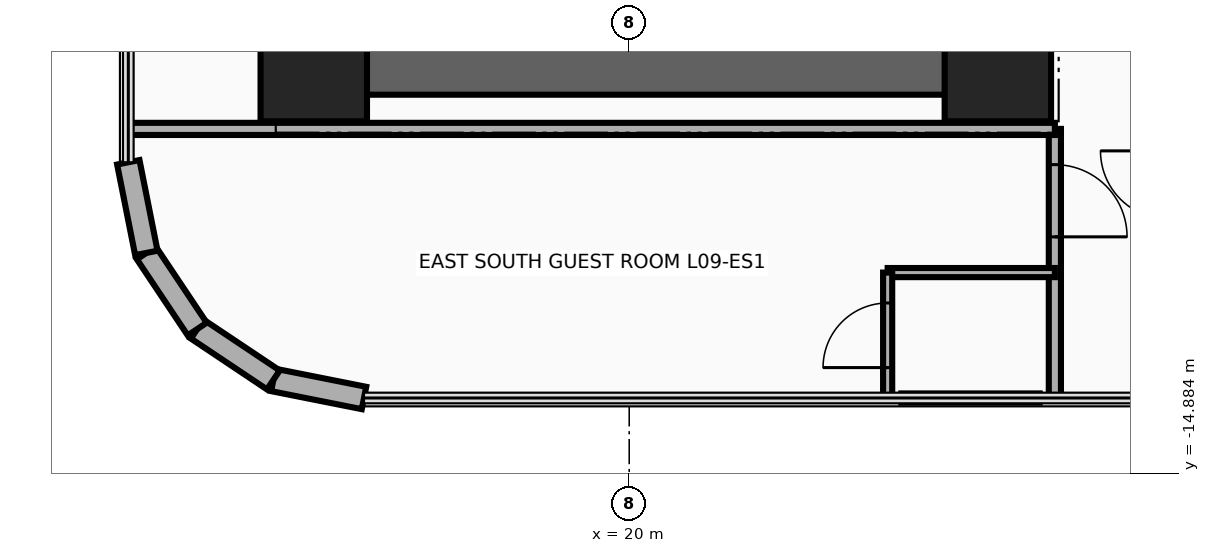
"""IFC4 building model, lengths in metres.
Left out: names, types, materials, properties, quantities, classifications, styles, units other than length and angle.
Written with IfcOpenShell. Run it as: python <this file> out.ifc"""

import sys

from ifc_helpers import new_model, si_unit, direction, frame, frame_2d, origin, origin_2d, place, context, subcontext, project, spatial, rectangle, extrude, source, transform, mapped, element, fill, save


model = new_model("IFC4")
c1 = context("Model", 3, precision=1e-05, world=origin(), true_north=direction((0.0, 1.0)))
c2 = subcontext(c1, "Body", "Model", "MODEL_VIEW")
j1 = project(units=[si_unit("LENGTHUNIT", "METRE"), si_unit("PLANEANGLEUNIT", "RADIAN")], contexts=[c1])
p1 = place(None, origin())
s1 = spatial("IfcSite", under=j1, at=p1, CompositionType="ELEMENT")
p2 = place(p1, origin())
s2 = spatial("IfcBuilding", under=s1, at=p2, CompositionType="ELEMENT")
p3 = place(p2, frame((0.0, 0.0, 40.8)))
s3 = spatial("IfcBuildingStorey", under=s2, at=p3, CompositionType="ELEMENT", Elevation=40.8)
p4 = place(p3, frame((24.85, -9.9, 0.0), z_axis=(0.0, 0.0, 1.0), x_axis=(0.0, 1.0, 0.0)))
e1 = element("IfcWall", 1, at=p4, inside=s3, PredefinedType="SHEAR", context=c2, shape_type="SweptSolid", body=[
    extrude(rectangle(XDim=8.95, YDim=0.7, at=frame_2d((4.475, 0.0))), origin(), (0.0, 0.0, 1.0), 3.46),
])
p5 = place(p3, frame((15.85, -9.55, 0.0), z_axis=(0.0, 0.0, 1.0), x_axis=(1.0, 0.0, 0.0)))
e2 = element("IfcWall", 2, at=p5, inside=s3, PredefinedType="SHEAR", context=c2, shape_type="SweptSolid", body=[
    extrude(rectangle(XDim=9.0, YDim=0.7, at=frame_2d((4.5, 0.0))), origin(), (0.0, 0.0, 1.0), 3.46),
])
m1 = source(origin(), c2, "Body", "SweptSolid", [
    extrude(rectangle(XDim=1.4, YDim=1.4, at=origin_2d()), origin(), (0.0, 0.0, 1.0), 3.7),
])
for number, where, z_axis, x_axis in (
    (3, (15.85, -9.55, 0.0), (0.0, 0.0, 1.0), (1.0, 0.0, 0.0)),
    (4, (24.85, -9.55, 0.0), (0.0, 0.0, 1.0), (1.0, 0.0, 0.0)),
):
    element("IfcColumn", number, at=place(p3, frame(where, z_axis=z_axis, x_axis=x_axis)), inside=s3, PredefinedType="COLUMN", context=c2, shape_type="MappedRepresentation", body=[
        mapped(m1, transform((0.0, 0.0, 0.0), x_axis=(1.0, 0.0, 0.0), y_axis=(0.0, 1.0, 0.0), z_axis=(0.0, 0.0, 1.0), scale=1.0)),
    ])
p6 = place(p3, frame((16.511, -13.89, 0.0), z_axis=(0.0, 0.0, 1.0), x_axis=(-0.980804027463, 0.194996050505, 0.0)))
e5 = element("IfcWall", 5, at=p6, inside=s3, PredefinedType="SOLIDWALL", context=c2, shape_type="SweptSolid", body=[
    extrude(rectangle(XDim=1.216, YDim=0.3, at=frame_2d((0.608, 0.0))), origin(), (0.0, 0.0, 1.0), 3.46),
])
for number, where, z_axis, x_axis in (
    (6, (15.318, -13.653, 0.0), (0.0, 0.0, 1.0), (-0.831, 0.556, 0.0)),
    (7, (14.317, -12.983, 0.0), (0.0, 0.0, 1.0), (-0.556, 0.831, 0.0)),
):
    element("IfcWall", number, at=place(p3, frame(where, z_axis=z_axis, x_axis=x_axis)), inside=s3, PredefinedType="SOLIDWALL", context=c2, shape_type="SweptSolid", body=[
        extrude(rectangle(XDim=1.205, YDim=0.3, at=frame_2d((0.603, 0.0))), origin(), (0.0, 0.0, 1.0), 3.46),
    ])
p7 = place(p3, frame((13.647, -11.982, 0.0), z_axis=(0.0, 0.0, 1.0), x_axis=(-0.195189223115, 0.980765602568, 0.0)))
e8 = element("IfcWall", 8, at=p7, inside=s3, PredefinedType="SOLIDWALL", context=c2, shape_type="SweptSolid", body=[
    extrude(rectangle(XDim=1.216, YDim=0.3, at=frame_2d((0.608, 0.0))), origin(), (0.0, 0.0, 1.0), 3.46),
])
p8 = place(p3, frame((25.6, -13.89, 0.0), z_axis=(0.0, 0.0, 1.0), x_axis=(0.0, 1.0, 0.0)))
e9 = element("IfcWall", 9, at=p8, inside=s3, PredefinedType="PARTITIONING", context=c2, shape_type="SweptSolid", body=[
    extrude(rectangle(XDim=3.54, YDim=0.16, at=frame_2d((1.77, 0.0))), origin(), (0.0, 0.0, 1.0), 3.46),
])
p9 = place(p8, frame((2.12, 0.0, 0.0)))
e10 = element("IfcOpeningElement", 10, at=p9, cuts=e9, PredefinedType="OPENING", context=c2, shape_type="SweptSolid", body=[
    extrude(rectangle(XDim=0.95, YDim=2.15, at=frame_2d((0.475, 1.075))), frame((0.0, 0.095, 0.0), z_axis=(0.0, -1.0, 0.0), x_axis=(1.0, 0.0, 0.0)), (0.0, 0.0, 1.0), 0.19),
])
p10 = place(p3, frame((13.41, -10.35, 0.0), z_axis=(0.0, 0.0, 1.0), x_axis=(1.0, 0.0, 0.0)))
e11 = element("IfcWall", 11, at=p10, inside=s3, PredefinedType="PARTITIONING", context=c2, shape_type="SweptSolid", body=[
    extrude(rectangle(XDim=12.19, YDim=0.16, at=frame_2d((6.095, 0.0))), origin(), (0.0, 0.0, 1.0), 3.46),
])
p11 = place(p3, frame((23.4, -12.24, 0.0), z_axis=(0.0, 0.0, 1.0), x_axis=(1.0, 0.0, 0.0)))
e12 = element("IfcWall", 12, at=p11, inside=s3, PredefinedType="PARTITIONING", context=c2, shape_type="SweptSolid", body=[
    extrude(rectangle(XDim=2.2, YDim=0.12, at=frame_2d((1.1, 0.0))), origin(), (0.0, 0.0, 1.0), 3.46),
])
p12 = place(p3, frame((23.4, -13.89, 0.0), z_axis=(0.0, 0.0, 1.0), x_axis=(0.0, 1.0, 0.0)))
e13 = element("IfcWall", 13, at=p12, inside=s3, PredefinedType="PARTITIONING", context=c2, shape_type="SweptSolid", body=[
    extrude(rectangle(XDim=1.65, YDim=0.12, at=frame_2d((0.825, 0.0))), origin(), (0.0, 0.0, 1.0), 3.46),
])
p13 = place(p12, frame((0.4, 0.0, 0.0)))
e14 = element("IfcOpeningElement", 14, at=p13, cuts=e13, PredefinedType="OPENING", context=c2, shape_type="SweptSolid", body=[
    extrude(rectangle(XDim=0.85, YDim=2.1, at=frame_2d((0.425, 1.05))), frame((0.0, 0.075, 0.0), z_axis=(0.0, -1.0, 0.0), x_axis=(1.0, 0.0, 0.0)), (0.0, 0.0, 1.0), 0.15),
])
p14 = place(p3, frame((23.58, -13.89, 0.0), z_axis=(0.0, 0.0, 1.0), x_axis=(1.0, 0.0, 0.0)))
e15 = element("IfcWall", 15, at=p14, inside=s3, PredefinedType="PARTITIONING", context=c2, shape_type="SweptSolid", body=[
    extrude(rectangle(XDim=1.82, YDim=0.12, at=frame_2d((0.91, 0.0))), origin(), (0.0, 0.0, 1.0), 3.46),
])
p15 = place(p9, frame((0.95, 0.0, 0.0), z_axis=(0.0, 0.0, 1.0), x_axis=(-1.0, 0.0, 0.0)))
e16 = element("IfcDoor", 16, at=p15, inside=s3, OperationType="SINGLE_SWING_LEFT", PredefinedType="DOOR", context=c2, shape_type="SweptSolid", body=[
    extrude(rectangle(XDim=0.95, YDim=2.15, at=frame_2d((0.475, 1.075))), frame((0.0, 0.025, 0.0), z_axis=(0.0, -1.0, 0.0), x_axis=(1.0, 0.0, 0.0)), (0.0, 0.0, 1.0), 0.05),
])
fill(e10, e16)
p16 = place(p13, origin())
e17 = element("IfcDoor", 17, at=p16, inside=s3, OperationType="SINGLE_SWING_RIGHT", PredefinedType="DOOR", context=c2, shape_type="SweptSolid", body=[
    extrude(rectangle(XDim=0.85, YDim=2.1, at=frame_2d((0.425, 1.05))), frame((0.0, 0.025, 0.0), z_axis=(0.0, -1.0, 0.0), x_axis=(1.0, 0.0, 0.0)), (0.0, 0.0, 1.0), 0.05),
])
fill(e14, e17)
save(model, sys.argv[1])
